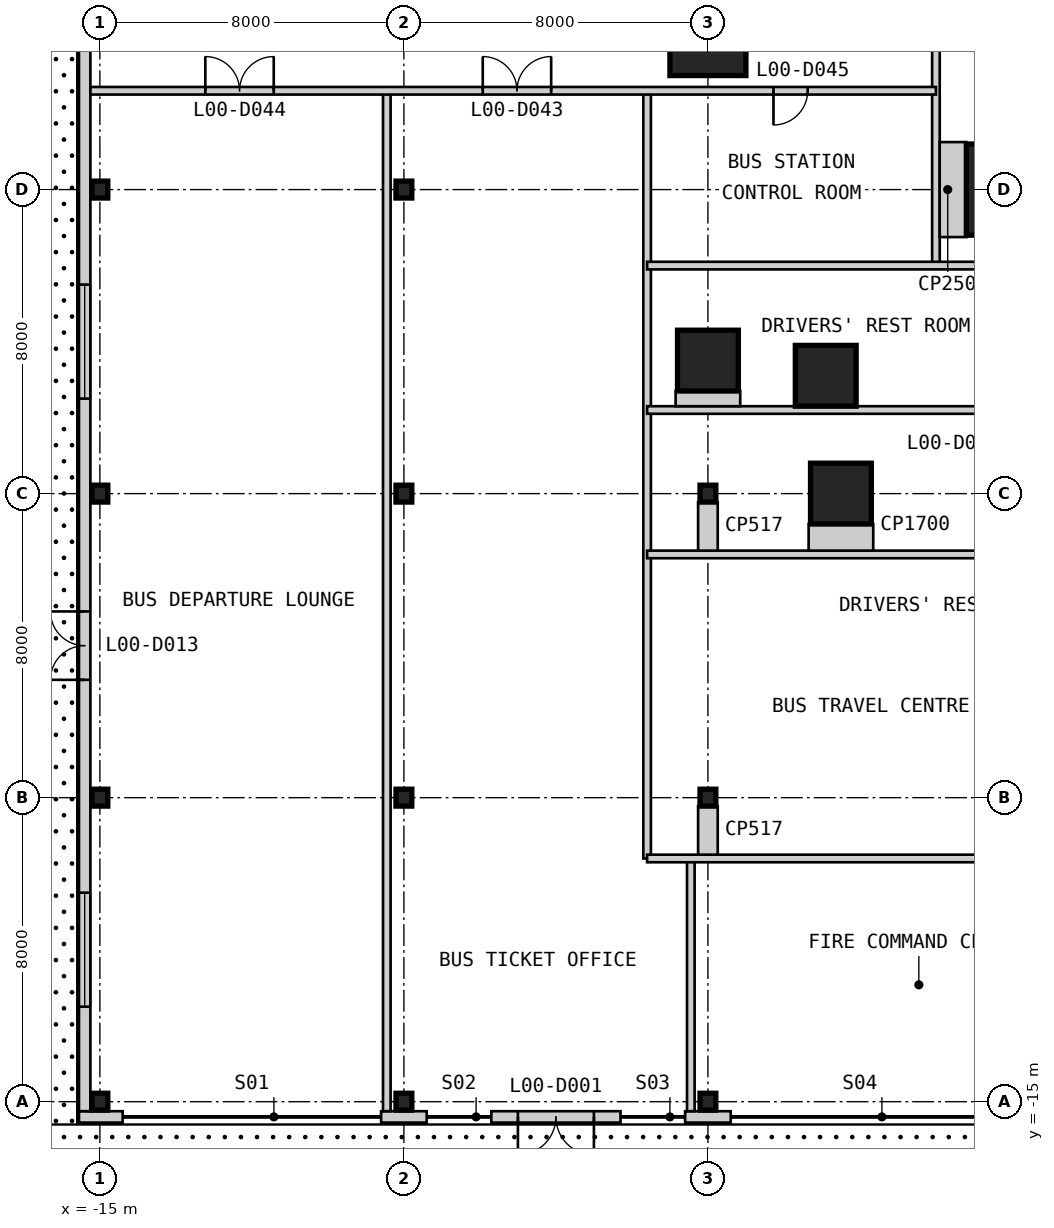
"""IFC4 building model, lengths in metres.
Left out: names, types, materials, properties, quantities, classifications, styles, units other than length and angle.
Written with IfcOpenShell. Run it as: python <this file> out.ifc"""

import sys

from ifc_helpers import new_model, si_unit, direction, frame, frame_2d, origin, origin_2d, place, context, subcontext, project, spatial, rectangle, i_section, extrude, element, fill, save


model = new_model("IFC4")
c1 = context("Model", 3, precision=1e-05, world=origin(), true_north=direction((0.0, 1.0)))
c2 = subcontext(c1, "Body", "Model", "MODEL_VIEW")
j1 = project(units=[si_unit("LENGTHUNIT", "METRE"), si_unit("PLANEANGLEUNIT", "RADIAN")], contexts=[c1])
p1 = place(None, origin())
s1 = spatial("IfcSite", under=j1, at=p1, CompositionType="ELEMENT")
p2 = place(p1, origin())
s2 = spatial("IfcBuilding", under=s1, at=p2, CompositionType="ELEMENT")
p3 = place(p2, origin())
s3 = spatial("IfcBuildingStorey", under=s2, at=p3, CompositionType="ELEMENT", Elevation=0.0)
p4 = place(p3, frame((9.0, 9.0, 0.0), z_axis=(0.0, 0.0, 1.0), x_axis=(1.0, 0.0, 0.0)))
e1 = element("IfcColumn", 1, at=p4, inside=s3, PredefinedType="COLUMN", context=c2, shape_type="SweptSolid", body=[
    extrude(rectangle(XDim=2.4, YDim=2.4, at=origin_2d()), origin(), (0.0, 0.0, 1.0), 7.0),
])
p5 = place(p3, frame((4.5, 1.0, 0.0), z_axis=(0.0, 0.0, 1.0), x_axis=(1.0, 0.0, 0.0)))
e2 = element("IfcColumn", 2, at=p5, inside=s3, PredefinedType="COLUMN", context=c2, shape_type="SweptSolid", body=[
    extrude(rectangle(XDim=1.6, YDim=1.6, at=origin_2d()), origin(), (0.0, 0.0, 1.0), 7.0),
])
p6 = place(p3, frame((1.0, 13.0, 0.0), z_axis=(0.0, 0.0, 1.0), x_axis=(1.0, 0.0, 0.0)))
e3 = element("IfcColumn", 3, at=p6, inside=s3, PredefinedType="COLUMN", context=c2, shape_type="SweptSolid", body=[
    extrude(rectangle(XDim=2.0, YDim=2.0, at=origin_2d()), origin(), (0.0, 0.0, 1.0), 7.0),
])
for number, where, z_axis, x_axis in (
    (4, (1.0, 4.5, 0.0), (0.0, 0.0, 1.0), (1.0, 0.0, 0.0)),
    (5, (4.1, 4.1, 0.0), (0.0, 0.0, 1.0), (1.0, 0.0, 0.0)),
):
    element("IfcColumn", number, at=place(p3, frame(where, z_axis=z_axis, x_axis=x_axis)), inside=s3, PredefinedType="COLUMN", context=c2, shape_type="SweptSolid", body=[
        extrude(rectangle(XDim=1.6, YDim=1.6, at=origin_2d()), origin(), (0.0, 0.0, 1.0), 7.0),
    ])
for number, where, z_axis, x_axis in (
    (6, (-15.0, -15.0, -0.3), (0.0, 0.0, 1.0), (1.0, 0.0, 0.0)),
    (7, (-15.0, -7.0, -0.3), (0.0, 0.0, 1.0), (1.0, 0.0, 0.0)),
    (8, (-15.0, 1.0, -0.3), (0.0, 0.0, 1.0), (1.0, 0.0, 0.0)),
    (9, (-15.0, 9.0, -0.3), (0.0, 0.0, 1.0), (1.0, 0.0, 0.0)),
    (10, (-7.0, -15.0, -0.3), (0.0, 0.0, 1.0), (1.0, 0.0, 0.0)),
):
    element("IfcColumn", number, at=place(p3, frame(where, z_axis=z_axis, x_axis=x_axis)), inside=s3, PredefinedType="COLUMN", context=c2, shape_type="SweptSolid", body=[
        extrude(i_section(OverallWidth=0.417, OverallDepth=0.445, WebThickness=0.039, FlangeThickness=0.063, at=origin_2d()), origin(), (0.0, 0.0, 1.0), 7.3),
    ])
for number, where, z_axis, x_axis in (
    (11, (-7.0, -7.0, 0.0), (0.0, 0.0, 1.0), (1.0, 0.0, 0.0)),
    (12, (-7.0, 1.0, 0.0), (0.0, 0.0, 1.0), (1.0, 0.0, 0.0)),
    (13, (-7.0, 9.0, 0.0), (0.0, 0.0, 1.0), (1.0, 0.0, 0.0)),
):
    element("IfcColumn", number, at=place(p3, frame(where, z_axis=z_axis, x_axis=x_axis)), inside=s3, PredefinedType="COLUMN", context=c2, shape_type="SweptSolid", body=[
        extrude(i_section(OverallWidth=0.417, OverallDepth=0.445, WebThickness=0.039, FlangeThickness=0.063, at=origin_2d()), origin(), (0.0, 0.0, 1.0), 7.0),
    ])
p7 = place(p3, frame((1.0, -15.0, -0.3), z_axis=(0.0, 0.0, 1.0), x_axis=(1.0, 0.0, 0.0)))
e14 = element("IfcColumn", 14, at=p7, inside=s3, PredefinedType="COLUMN", context=c2, shape_type="SweptSolid", body=[
    extrude(i_section(OverallWidth=0.417, OverallDepth=0.445, WebThickness=0.039, FlangeThickness=0.063, at=origin_2d()), origin(), (0.0, 0.0, 1.0), 7.3),
])
for number, where, z_axis, x_axis in (
    (15, (1.0, -7.0, 0.0), (0.0, 0.0, 1.0), (1.0, 0.0, 0.0)),
    (16, (1.0, 1.0, 0.0), (0.0, 0.0, 1.0), (1.0, 0.0, 0.0)),
):
    element("IfcColumn", number, at=place(p3, frame(where, z_axis=z_axis, x_axis=x_axis)), inside=s3, PredefinedType="COLUMN", context=c2, shape_type="SweptSolid", body=[
        extrude(i_section(OverallWidth=0.417, OverallDepth=0.445, WebThickness=0.039, FlangeThickness=0.063, at=origin_2d()), origin(), (0.0, 0.0, 1.0), 7.0),
    ])
p8 = place(p3, frame((-15.55, -15.4, 0.0), z_axis=(0.0, 0.0, 1.0), x_axis=(1.0, 0.0, 0.0)))
e17 = element("IfcWall", 17, at=p8, inside=s3, PredefinedType="SOLIDWALL", context=c2, shape_type="SweptSolid", body=[
    extrude(rectangle(XDim=1.15, YDim=0.3, at=frame_2d((0.575, 0.0))), origin(), (0.0, 0.0, 1.0), 6.7),
])
p9 = place(p3, frame((-7.6, -15.4, 0.0), z_axis=(0.0, 0.0, 1.0), x_axis=(1.0, 0.0, 0.0)))
e18 = element("IfcWall", 18, at=p9, inside=s3, PredefinedType="SOLIDWALL", context=c2, shape_type="SweptSolid", body=[
    extrude(rectangle(XDim=1.2, YDim=0.3, at=frame_2d((0.6, 0.0))), origin(), (0.0, 0.0, 1.0), 6.7),
])
p10 = place(p3, frame((-4.7, -15.4, 0.0), z_axis=(0.0, 0.0, 1.0), x_axis=(1.0, 0.0, 0.0)))
e19 = element("IfcWall", 19, at=p10, inside=s3, PredefinedType="SOLIDWALL", context=c2, shape_type="SweptSolid", body=[
    extrude(rectangle(XDim=3.4, YDim=0.3, at=frame_2d((1.7, 0.0))), origin(), (0.0, 0.0, 1.0), 6.7),
])
p11 = place(p10, frame((0.7, 0.0, 0.0)))
e20 = element("IfcOpeningElement", 20, at=p11, cuts=e19, PredefinedType="OPENING", context=c2, shape_type="SweptSolid", body=[
    extrude(rectangle(XDim=2.0, YDim=3.0, at=frame_2d((1.0, 1.5))), frame((0.0, 0.16, 0.0), z_axis=(0.0, -1.0, 0.0), x_axis=(1.0, 0.0, 0.0)), (0.0, 0.0, 1.0), 0.32),
])
p12 = place(p3, frame((0.4, -15.4, 0.0), z_axis=(0.0, 0.0, 1.0), x_axis=(1.0, 0.0, 0.0)))
e21 = element("IfcWall", 21, at=p12, inside=s3, PredefinedType="SOLIDWALL", context=c2, shape_type="SweptSolid", body=[
    extrude(rectangle(XDim=1.2, YDim=0.3, at=frame_2d((0.6, 0.0))), origin(), (0.0, 0.0, 1.0), 6.7),
])
p13 = place(p3, frame((-15.4, 65.25, 0.0), z_axis=(0.0, 0.0, 1.0), x_axis=(0.0, -1.0, 0.0)))
e22 = element("IfcWall", 22, at=p13, inside=s3, PredefinedType="SOLIDWALL", context=c2, shape_type="SweptSolid", body=[
    extrude(rectangle(XDim=80.5, YDim=0.3, at=frame_2d((40.25, 0.0))), origin(), (0.0, 0.0, 1.0), 6.7),
])
p14 = place(p13, frame((67.35, 0.0, 0.0)))
e23 = element("IfcOpeningElement", 23, at=p14, cuts=e22, PredefinedType="OPENING", context=c2, shape_type="SweptSolid", body=[
    extrude(rectangle(XDim=1.8, YDim=2.4, at=frame_2d((0.9, 1.2))), frame((0.0, 0.16, 0.0), z_axis=(0.0, -1.0, 0.0), x_axis=(1.0, 0.0, 0.0)), (0.0, 0.0, 1.0), 0.32),
])
p15 = place(p13, frame((45.35, 0.0, 0.0)))
e24 = element("IfcOpeningElement", 24, at=p15, cuts=e22, PredefinedType="OPENING", context=c2, shape_type="SweptSolid", body=[
    extrude(rectangle(XDim=1.8, YDim=2.4, at=frame_2d((0.9, 1.2))), frame((0.0, 0.16, 0.0), z_axis=(0.0, -1.0, 0.0), x_axis=(1.0, 0.0, 0.0)), (0.0, 0.0, 1.0), 0.32),
])
p16 = place(p13, frame((33.35, 0.0, 0.0)))
e25 = element("IfcOpeningElement", 25, at=p16, cuts=e22, PredefinedType="OPENING", context=c2, shape_type="SweptSolid", body=[
    extrude(rectangle(XDim=1.8, YDim=2.4, at=frame_2d((0.9, 1.2))), frame((0.0, 0.16, 0.0), z_axis=(0.0, -1.0, 0.0), x_axis=(1.0, 0.0, 0.0)), (0.0, 0.0, 1.0), 0.32),
])
p17 = place(p13, frame((11.35, 0.0, 0.0)))
e26 = element("IfcOpeningElement", 26, at=p17, cuts=e22, PredefinedType="OPENING", context=c2, shape_type="SweptSolid", body=[
    extrude(rectangle(XDim=1.8, YDim=2.4, at=frame_2d((0.9, 1.2))), frame((0.0, 0.16, 0.0), z_axis=(0.0, -1.0, 0.0), x_axis=(1.0, 0.0, 0.0)), (0.0, 0.0, 1.0), 0.32),
])
p18 = place(p13, frame((74.75, 0.0, 0.9)))
e27 = element("IfcOpeningElement", 27, at=p18, cuts=e22, PredefinedType="OPENING", context=c2, shape_type="SweptSolid", body=[
    extrude(rectangle(XDim=3.0, YDim=2.4, at=frame_2d((1.5, 1.2))), frame((0.0, 0.16, 0.0), z_axis=(0.0, -1.0, 0.0), x_axis=(1.0, 0.0, 0.0)), (0.0, 0.0, 1.0), 0.32),
])
p19 = place(p13, frame((58.75, 0.0, 0.9)))
e28 = element("IfcOpeningElement", 28, at=p19, cuts=e22, PredefinedType="OPENING", context=c2, shape_type="SweptSolid", body=[
    extrude(rectangle(XDim=3.0, YDim=2.4, at=frame_2d((1.5, 1.2))), frame((0.0, 0.16, 0.0), z_axis=(0.0, -1.0, 0.0), x_axis=(1.0, 0.0, 0.0)), (0.0, 0.0, 1.0), 0.32),
])
p20 = place(p13, frame((24.25, 0.0, 0.9)))
e29 = element("IfcOpeningElement", 29, at=p20, cuts=e22, PredefinedType="OPENING", context=c2, shape_type="SweptSolid", body=[
    extrude(rectangle(XDim=3.0, YDim=2.4, at=frame_2d((1.5, 1.2))), frame((0.0, 0.16, 0.0), z_axis=(0.0, -1.0, 0.0), x_axis=(1.0, 0.0, 0.0)), (0.0, 0.0, 1.0), 0.32),
])
p21 = place(p13, frame((18.25, 0.0, 0.9)))
e30 = element("IfcOpeningElement", 30, at=p21, cuts=e22, PredefinedType="OPENING", context=c2, shape_type="SweptSolid", body=[
    extrude(rectangle(XDim=3.0, YDim=2.4, at=frame_2d((1.5, 1.2))), frame((0.0, 0.16, 0.0), z_axis=(0.0, -1.0, 0.0), x_axis=(1.0, 0.0, 0.0)), (0.0, 0.0, 1.0), 0.32),
])
p22 = place(p13, frame((2.75, 0.0, 0.9)))
e31 = element("IfcOpeningElement", 31, at=p22, cuts=e22, PredefinedType="OPENING", context=c2, shape_type="SweptSolid", body=[
    extrude(rectangle(XDim=3.0, YDim=2.4, at=frame_2d((1.5, 1.2))), frame((0.0, 0.16, 0.0), z_axis=(0.0, -1.0, 0.0), x_axis=(1.0, 0.0, 0.0)), (0.0, 0.0, 1.0), 0.32),
])
p23 = place(p3, frame((-7.45, -15.25, 0.0), z_axis=(0.0, 0.0, 1.0), x_axis=(0.0, 1.0, 0.0)))
e32 = element("IfcWall", 32, at=p23, inside=s3, PredefinedType="PARTITIONING", context=c2, shape_type="SweptSolid", body=[
    extrude(rectangle(XDim=26.85, YDim=0.2, at=frame_2d((13.425, 0.0))), origin(), (0.0, 0.0, 1.0), 6.7),
])
p24 = place(p3, frame((-0.6, -8.6, 0.0), z_axis=(0.0, 0.0, 1.0), x_axis=(0.0, 1.0, 0.0)))
e33 = element("IfcWall", 33, at=p24, inside=s3, PredefinedType="PARTITIONING", context=c2, shape_type="SweptSolid", body=[
    extrude(rectangle(XDim=20.2, YDim=0.2, at=frame_2d((10.1, 0.0))), origin(), (0.0, 0.0, 1.0), 6.7),
])
p25 = place(p3, frame((0.55, -15.25, 0.0), z_axis=(0.0, 0.0, 1.0), x_axis=(0.0, 1.0, 0.0)))
e34 = element("IfcWall", 34, at=p25, inside=s3, PredefinedType="PARTITIONING", context=c2, shape_type="SweptSolid", body=[
    extrude(rectangle(XDim=6.65, YDim=0.2, at=frame_2d((3.325, 0.0))), origin(), (0.0, 0.0, 1.0), 6.7),
])
p26 = place(p3, frame((7.0, 7.0, 0.0), z_axis=(0.0, 0.0, 1.0), x_axis=(0.0, 1.0, 0.0)))
e35 = element("IfcWall", 35, at=p26, inside=s3, PredefinedType="PARTITIONING", context=c2, shape_type="SweptSolid", body=[
    extrude(rectangle(XDim=6.0, YDim=0.2, at=frame_2d((3.0, 0.0))), origin(), (0.0, 0.0, 1.0), 6.7),
])
p27 = place(p3, frame((-0.6, -8.6, 0.0), z_axis=(0.0, 0.0, 1.0), x_axis=(1.0, 0.0, 0.0)))
e36 = element("IfcWall", 36, at=p27, inside=s3, PredefinedType="PARTITIONING", context=c2, shape_type="SweptSolid", body=[
    extrude(rectangle(XDim=13.15, YDim=0.2, at=frame_2d((6.575, 0.0))), origin(), (0.0, 0.0, 1.0), 6.7),
])
for number, where, z_axis, x_axis in (
    (37, (-0.6, -0.6, 0.0), (0.0, 0.0, 1.0), (1.0, 0.0, 0.0)),
    (38, (-0.6, 3.2, 0.0), (0.0, 0.0, 1.0), (1.0, 0.0, 0.0)),
):
    element("IfcWall", number, at=place(p3, frame(where, z_axis=z_axis, x_axis=x_axis)), inside=s3, PredefinedType="PARTITIONING", context=c2, shape_type="SweptSolid", body=[
        extrude(rectangle(XDim=12.2, YDim=0.2, at=frame_2d((6.1, 0.0))), origin(), (0.0, 0.0, 1.0), 6.7),
    ])
p28 = place(p3, frame((-0.6, 7.0, 0.0), z_axis=(0.0, 0.0, 1.0), x_axis=(1.0, 0.0, 0.0)))
e39 = element("IfcWall", 39, at=p28, inside=s3, PredefinedType="PARTITIONING", context=c2, shape_type="SweptSolid", body=[
    extrude(rectangle(XDim=17.0, YDim=0.2, at=frame_2d((8.5, 0.0))), origin(), (0.0, 0.0, 1.0), 6.7),
])
p29 = place(p28, frame((14.125, 0.0, 0.0)))
e40 = element("IfcOpeningElement", 40, at=p29, cuts=e39, PredefinedType="OPENING", context=c2, shape_type="SweptSolid", body=[
    extrude(rectangle(XDim=0.9, YDim=2.2, at=frame_2d((0.45, 1.1))), frame((0.0, 0.11, 0.0), z_axis=(0.0, -1.0, 0.0), x_axis=(1.0, 0.0, 0.0)), (0.0, 0.0, 1.0), 0.22),
])
p30 = place(p3, frame((-15.25, 11.6, 0.0), z_axis=(0.0, 0.0, 1.0), x_axis=(1.0, 0.0, 0.0)))
e41 = element("IfcWall", 41, at=p30, inside=s3, PredefinedType="PARTITIONING", context=c2, shape_type="SweptSolid", body=[
    extrude(rectangle(XDim=22.25, YDim=0.2, at=frame_2d((11.125, 0.0))), origin(), (0.0, 0.0, 1.0), 6.7),
])
p31 = place(p30, frame((10.325, 0.0, 0.0)))
e42 = element("IfcOpeningElement", 42, at=p31, cuts=e41, PredefinedType="OPENING", context=c2, shape_type="SweptSolid", body=[
    extrude(rectangle(XDim=1.8, YDim=2.4, at=frame_2d((0.9, 1.2))), frame((0.0, 0.11, 0.0), z_axis=(0.0, -1.0, 0.0), x_axis=(1.0, 0.0, 0.0)), (0.0, 0.0, 1.0), 0.22),
])
p32 = place(p30, frame((3.025, 0.0, 0.0)))
e43 = element("IfcOpeningElement", 43, at=p32, cuts=e41, PredefinedType="OPENING", context=c2, shape_type="SweptSolid", body=[
    extrude(rectangle(XDim=1.8, YDim=2.4, at=frame_2d((0.9, 1.2))), frame((0.0, 0.11, 0.0), z_axis=(0.0, -1.0, 0.0), x_axis=(1.0, 0.0, 0.0)), (0.0, 0.0, 1.0), 0.22),
])
p33 = place(p30, frame((17.975, 0.0, 0.0)))
e44 = element("IfcOpeningElement", 44, at=p33, cuts=e41, PredefinedType="OPENING", context=c2, shape_type="SweptSolid", body=[
    extrude(rectangle(XDim=0.9, YDim=2.2, at=frame_2d((0.45, 1.1))), frame((0.0, 0.11, 0.0), z_axis=(0.0, -1.0, 0.0), x_axis=(1.0, 0.0, 0.0)), (0.0, 0.0, 1.0), 0.22),
])
p34 = place(p3, frame((1.0, -8.5, 0.0), z_axis=(0.0, 0.0, 1.0), x_axis=(0.0, 1.0, 0.0)))
e45 = element("IfcWall", 45, at=p34, inside=s3, PredefinedType="PARTITIONING", context=c2, shape_type="SweptSolid", body=[
    extrude(rectangle(XDim=1.278, YDim=0.517, at=frame_2d((0.639, 0.0))), origin(), (0.0, 0.0, 1.0), 5.954),
])
p35 = place(p3, frame((4.5, -0.5, 0.0), z_axis=(0.0, 0.0, 1.0), x_axis=(0.0, 1.0, 0.0)))
e46 = element("IfcWall", 46, at=p35, inside=s3, PredefinedType="PARTITIONING", context=c2, shape_type="SweptSolid", body=[
    extrude(rectangle(XDim=0.7, YDim=1.7, at=frame_2d((0.35, 0.0))), origin(), (0.0, 0.0, 1.0), 6.7),
])
p36 = place(p3, frame((1.0, -0.5, 0.0), z_axis=(0.0, 0.0, 1.0), x_axis=(0.0, 1.0, 0.0)))
e47 = element("IfcWall", 47, at=p36, inside=s3, PredefinedType="PARTITIONING", context=c2, shape_type="SweptSolid", body=[
    extrude(rectangle(XDim=1.278, YDim=0.517, at=frame_2d((0.639, 0.0))), origin(), (0.0, 0.0, 1.0), 5.954),
])
p37 = place(p3, frame((1.0, 3.3, 0.0), z_axis=(0.0, 0.0, 1.0), x_axis=(0.0, 1.0, 0.0)))
e48 = element("IfcWall", 48, at=p37, inside=s3, PredefinedType="PARTITIONING", context=c2, shape_type="SweptSolid", body=[
    extrude(rectangle(XDim=0.4, YDim=1.7, at=frame_2d((0.2, 0.0))), origin(), (0.0, 0.0, 1.0), 6.7),
])
p38 = place(p3, frame((7.1, 9.0, 0.0), z_axis=(0.0, 0.0, 1.0), x_axis=(1.0, 0.0, 0.0)))
e49 = element("IfcWall", 49, at=p38, inside=s3, PredefinedType="PARTITIONING", context=c2, shape_type="SweptSolid", body=[
    extrude(rectangle(XDim=0.7, YDim=2.5, at=frame_2d((0.35, 0.0))), origin(), (0.0, 0.0, 1.0), 6.7),
])
p39 = place(p11, frame((2.0, 0.0, 0.0), z_axis=(0.0, 0.0, 1.0), x_axis=(-1.0, 0.0, 0.0)))
e50 = element("IfcDoor", 50, at=p39, inside=s3, OperationType="DOUBLE_DOOR_SINGLE_SWING", PredefinedType="DOOR", context=c2, shape_type="SweptSolid", body=[
    extrude(rectangle(XDim=2.0, YDim=3.0, at=frame_2d((1.0, 1.5))), frame((0.0, 0.025, 0.0), z_axis=(0.0, -1.0, 0.0), x_axis=(1.0, 0.0, 0.0)), (0.0, 0.0, 1.0), 0.05),
])
fill(e20, e50)
p40 = place(p14, frame((1.8, 0.0, 0.0), z_axis=(0.0, 0.0, 1.0), x_axis=(-1.0, 0.0, 0.0)))
e51 = element("IfcDoor", 51, at=p40, inside=s3, OperationType="DOUBLE_DOOR_SINGLE_SWING", PredefinedType="DOOR", context=c2, shape_type="SweptSolid", body=[
    extrude(rectangle(XDim=1.8, YDim=2.4, at=frame_2d((0.9, 1.2))), frame((0.0, 0.025, 0.0), z_axis=(0.0, -1.0, 0.0), x_axis=(1.0, 0.0, 0.0)), (0.0, 0.0, 1.0), 0.05),
])
fill(e23, e51)
p41 = place(p18, origin())
e52 = element("IfcWindow", 52, at=p41, inside=s3, PartitioningType="SINGLE_PANEL", PredefinedType="WINDOW", context=c2, shape_type="SweptSolid", body=[
    extrude(rectangle(XDim=3.0, YDim=2.4, at=frame_2d((1.5, 1.2))), frame((0.0, 0.03, 0.0), z_axis=(0.0, -1.0, 0.0), x_axis=(1.0, 0.0, 0.0)), (0.0, 0.0, 1.0), 0.06),
])
fill(e27, e52)
p42 = place(p19, origin())
e53 = element("IfcWindow", 53, at=p42, inside=s3, PartitioningType="SINGLE_PANEL", PredefinedType="WINDOW", context=c2, shape_type="SweptSolid", body=[
    extrude(rectangle(XDim=3.0, YDim=2.4, at=frame_2d((1.5, 1.2))), frame((0.0, 0.03, 0.0), z_axis=(0.0, -1.0, 0.0), x_axis=(1.0, 0.0, 0.0)), (0.0, 0.0, 1.0), 0.06),
])
fill(e28, e53)
p43 = place(p31, origin())
e54 = element("IfcDoor", 54, at=p43, inside=s3, OperationType="DOUBLE_DOOR_SINGLE_SWING", PredefinedType="DOOR", context=c2, shape_type="SweptSolid", body=[
    extrude(rectangle(XDim=1.8, YDim=2.4, at=frame_2d((0.9, 1.2))), frame((0.0, 0.025, 0.0), z_axis=(0.0, -1.0, 0.0), x_axis=(1.0, 0.0, 0.0)), (0.0, 0.0, 1.0), 0.05),
])
fill(e42, e54)
p44 = place(p32, origin())
e55 = element("IfcDoor", 55, at=p44, inside=s3, OperationType="DOUBLE_DOOR_SINGLE_SWING", PredefinedType="DOOR", context=c2, shape_type="SweptSolid", body=[
    extrude(rectangle(XDim=1.8, YDim=2.4, at=frame_2d((0.9, 1.2))), frame((0.0, 0.025, 0.0), z_axis=(0.0, -1.0, 0.0), x_axis=(1.0, 0.0, 0.0)), (0.0, 0.0, 1.0), 0.05),
])
fill(e43, e55)
p45 = place(p33, frame((0.9, 0.0, 0.0), z_axis=(0.0, 0.0, 1.0), x_axis=(-1.0, 0.0, 0.0)))
e56 = element("IfcDoor", 56, at=p45, inside=s3, OperationType="SINGLE_SWING_RIGHT", PredefinedType="DOOR", context=c2, shape_type="SweptSolid", body=[
    extrude(rectangle(XDim=0.9, YDim=2.2, at=frame_2d((0.45, 1.1))), frame((0.0, 0.025, 0.0), z_axis=(0.0, -1.0, 0.0), x_axis=(1.0, 0.0, 0.0)), (0.0, 0.0, 1.0), 0.05),
])
fill(e44, e56)
save(model, sys.argv[1])
